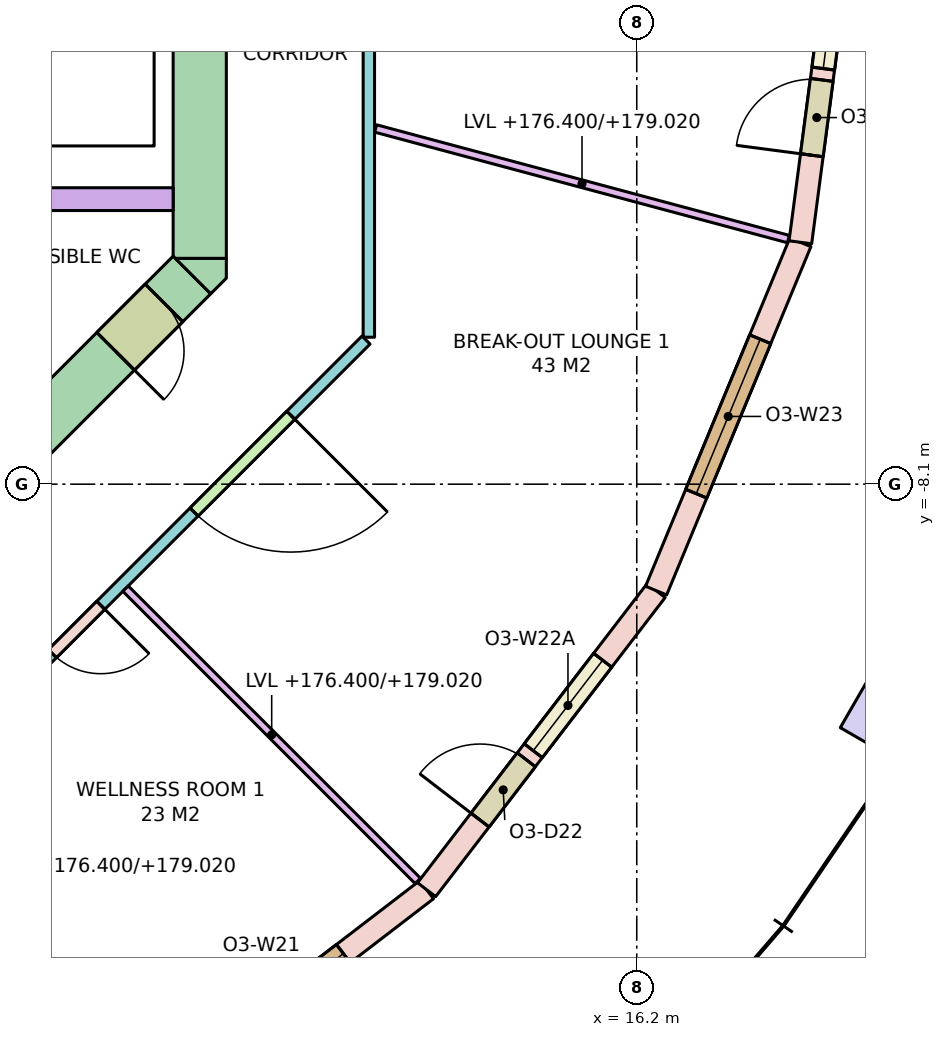
"""IFC4 building model, lengths in metres.
Left out: names, types, materials, properties, quantities, classifications, styles, units other than length and angle.
Written with IfcOpenShell. Run it as: python <this file> out.ifc"""

import sys

from ifc_helpers import new_model, si_unit, direction, frame, frame_2d, origin, origin_2d, place, context, subcontext, project, spatial, polyline, rectangle, outline, extrude, element, fill, save


model = new_model("IFC4")
c1 = context("Model", 3, precision=1e-05, world=origin(), true_north=direction((0.0, 1.0)))
c2 = subcontext(c1, "Body", "Model", "MODEL_VIEW")
j1 = project(units=[si_unit("LENGTHUNIT", "METRE"), si_unit("PLANEANGLEUNIT", "RADIAN")], contexts=[c1])
p1 = place(None, origin())
s1 = spatial("IfcSite", under=j1, at=p1, CompositionType="ELEMENT")
p2 = place(p1, origin())
s2 = spatial("IfcBuilding", under=s1, at=p2, CompositionType="ELEMENT")
p3 = place(p2, frame((0.0, 0.0, 176.4)))
s3 = spatial("IfcBuildingStorey", under=s2, at=p3, CompositionType="ELEMENT", Elevation=176.4)
p4 = place(p3, frame((19.486, -11.25, 0.0), z_axis=(0.0, 0.0, 1.0), x_axis=(0.5, 0.866025403784, 0.0)))
e1 = element("IfcColumn", 1, at=p4, inside=s3, PredefinedType="COLUMN", context=c2, shape_type="SweptSolid", body=[
    extrude(rectangle(XDim=0.7, YDim=1.0, at=origin_2d()), origin(), (0.0, 0.0, 1.0), 3.7),
])
p5 = place(p3, frame((10.45, -5.13, -0.28), z_axis=(0.0, 0.0, 1.0), x_axis=(0.0, 1.0, 0.0)))
e2 = element("IfcWall", 2, at=p5, inside=s3, PredefinedType="SHEAR", context=c2, shape_type="SweptSolid", body=[
    extrude(rectangle(XDim=10.26, YDim=0.7, at=frame_2d((5.13, 0.0))), origin(), (0.0, 0.0, 1.0), 3.7),
])
p6 = place(p5, frame((4.13, 0.0, 0.28)))
e3 = element("IfcOpeningElement", 3, at=p6, cuts=e2, PredefinedType="OPENING", context=c2, shape_type="SweptSolid", body=[
    extrude(rectangle(XDim=2.0, YDim=2.1, at=frame_2d((1.0, 1.05))), frame((0.0, 0.36, 0.0), z_axis=(0.0, -1.0, 0.0), x_axis=(1.0, 0.0, 0.0)), (0.0, 0.0, 1.0), 0.72),
])
p7 = place(p3, frame((10.347, -5.347, -0.28), z_axis=(0.0, 0.0, 1.0), x_axis=(-0.707106781187, -0.707106781187, 0.0)))
e4 = element("IfcWall", 4, at=p7, inside=s3, PredefinedType="SHEAR", context=c2, shape_type="SweptSolid", body=[
    extrude(rectangle(XDim=4.243, YDim=0.7, at=frame_2d((2.121, 0.0))), origin(), (0.0, 0.0, 1.0), 3.7),
])
p8 = place(p7, frame((0.52, 0.0, 0.28)))
e5 = element("IfcOpeningElement", 5, at=p8, cuts=e4, PredefinedType="OPENING", context=c2, shape_type="SweptSolid", body=[
    extrude(rectangle(XDim=0.9, YDim=2.1, at=frame_2d((0.45, 1.05))), frame((0.0, 0.36, 0.0), z_axis=(0.0, -1.0, 0.0), x_axis=(1.0, 0.0, 0.0)), (0.0, 0.0, 1.0), 0.72),
])
p9 = place(p3, frame((0.0, 0.0, -0.28)))
e6 = element("IfcWall", 6, at=p9, inside=s3, PredefinedType="SHEAR", context=c2, shape_type="SweptSolid", body=[
    extrude(outline(polyline([(10.8, -5.39), (10.595, -5.595), (10.595, -5.595), (10.595, -5.595), (10.13, -5.13), (10.8, -5.13), (10.8, -5.13), (10.8, -5.39)])), origin(), (0.0, 0.0, 1.0), 3.7),
])
p10 = place(p3, frame((2.0, -4.35, 0.0), z_axis=(0.0, 0.0, 1.0), x_axis=(1.0, 0.0, 0.0)))
e7 = element("IfcWall", 7, at=p10, inside=s3, PredefinedType="SOLIDWALL", context=c2, shape_type="SweptSolid", body=[
    extrude(rectangle(XDim=8.1, YDim=0.3, at=frame_2d((4.05, 0.0))), origin(), (0.0, 0.0, 1.0), 3.42),
])
p11 = place(p3, frame((9.5, -16.455, 0.0), z_axis=(0.0, 0.0, 1.0), x_axis=(0.793348024649, 0.608768356425, 0.0)))
e8 = element("IfcWall", 8, at=p11, inside=s3, PredefinedType="STANDARD", context=c2, shape_type="SweptSolid", body=[
    extrude(rectangle(XDim=4.96, YDim=0.3, at=frame_2d((2.48, 0.0))), origin(), (0.0, 0.0, 1.0), 3.42),
])
p12 = place(p11, frame((1.38, 0.0, 0.8)))
e9 = element("IfcOpeningElement", 9, at=p12, cuts=e8, PredefinedType="OPENING", context=c2, shape_type="SweptSolid", body=[
    extrude(rectangle(XDim=2.2, YDim=2.4, at=frame_2d((1.1, 1.2))), frame((0.0, 0.16, 0.0), z_axis=(0.0, -1.0, 0.0), x_axis=(1.0, 0.0, 0.0)), (0.0, 0.0, 1.0), 0.32),
])
p13 = place(p3, frame((13.435, -13.435, 0.0), z_axis=(0.0, 0.0, 1.0), x_axis=(0.608768356425, 0.793348024649, 0.0)))
e10 = element("IfcWall", 10, at=p13, inside=s3, PredefinedType="STANDARD", context=c2, shape_type="SweptSolid", body=[
    extrude(rectangle(XDim=4.96, YDim=0.3, at=frame_2d((2.48, 0.0))), origin(), (0.0, 0.0, 1.0), 3.42),
])
p14 = place(p13, frame((1.155, 0.0, 0.0)))
e11 = element("IfcOpeningElement", 11, at=p14, cuts=e10, PredefinedType="OPENING", context=c2, shape_type="SweptSolid", body=[
    extrude(rectangle(XDim=1.0, YDim=2.4, at=frame_2d((0.5, 1.2))), frame((0.0, 0.16, 0.0), z_axis=(0.0, -1.0, 0.0), x_axis=(1.0, 0.0, 0.0)), (0.0, 0.0, 1.0), 0.32),
])
p15 = place(p13, frame((2.305, 0.0, 0.8)))
e12 = element("IfcOpeningElement", 12, at=p15, cuts=e10, PredefinedType="OPENING", context=c2, shape_type="SweptSolid", body=[
    extrude(rectangle(XDim=1.5, YDim=2.4, at=frame_2d((0.75, 1.2))), frame((0.0, 0.16, 0.0), z_axis=(0.0, -1.0, 0.0), x_axis=(1.0, 0.0, 0.0)), (0.0, 0.0, 1.0), 0.32),
])
p16 = place(p3, frame((16.455, -9.5, 0.0), z_axis=(0.0, 0.0, 1.0), x_axis=(0.382650301762, 0.923893254961, 0.0)))
e13 = element("IfcWall", 13, at=p16, inside=s3, PredefinedType="STANDARD", context=c2, shape_type="SweptSolid", body=[
    extrude(rectangle(XDim=4.96, YDim=0.3, at=frame_2d((2.48, 0.0))), origin(), (0.0, 0.0, 1.0), 3.42),
])
p17 = place(p16, frame((1.38, 0.0, 0.8)))
e14 = element("IfcOpeningElement", 14, at=p17, cuts=e13, PredefinedType="OPENING", context=c2, shape_type="SweptSolid", body=[
    extrude(rectangle(XDim=2.2, YDim=2.4, at=frame_2d((1.1, 1.2))), frame((0.0, 0.16, 0.0), z_axis=(0.0, -1.0, 0.0), x_axis=(1.0, 0.0, 0.0)), (0.0, 0.0, 1.0), 0.32),
])
p18 = place(p3, frame((18.353, -4.917, 0.0), z_axis=(0.0, 0.0, 1.0), x_axis=(0.130538549191, 0.991443234469, 0.0)))
e15 = element("IfcWall", 15, at=p18, inside=s3, PredefinedType="STANDARD", context=c2, shape_type="SweptSolid", body=[
    extrude(rectangle(XDim=4.96, YDim=0.3, at=frame_2d((2.48, 0.0))), origin(), (0.0, 0.0, 1.0), 3.42),
])
p19 = place(p18, frame((1.155, 0.0, 0.0)))
e16 = element("IfcOpeningElement", 16, at=p19, cuts=e15, PredefinedType="OPENING", context=c2, shape_type="SweptSolid", body=[
    extrude(rectangle(XDim=1.0, YDim=2.4, at=frame_2d((0.5, 1.2))), frame((0.0, 0.16, 0.0), z_axis=(0.0, -1.0, 0.0), x_axis=(1.0, 0.0, 0.0)), (0.0, 0.0, 1.0), 0.32),
])
p20 = place(p18, frame((2.305, 0.0, 0.8)))
e17 = element("IfcOpeningElement", 17, at=p20, cuts=e15, PredefinedType="OPENING", context=c2, shape_type="SweptSolid", body=[
    extrude(rectangle(XDim=1.5, YDim=2.4, at=frame_2d((0.75, 1.2))), frame((0.0, 0.16, 0.0), z_axis=(0.0, -1.0, 0.0), x_axis=(1.0, 0.0, 0.0)), (0.0, 0.0, 1.0), 0.32),
])
p21 = place(p3, frame((12.638, -6.204, 0.0), z_axis=(0.0, 0.0, 1.0), x_axis=(-0.707106781187, -0.707106781187, 0.0)))
e18 = element("IfcWall", 18, at=p21, inside=s3, PredefinedType="PARTITIONING", context=c2, shape_type="SweptSolid", body=[
    extrude(rectangle(XDim=6.271, YDim=0.15, at=frame_2d((3.135, 0.0))), origin(), (0.0, 0.0, 1.0), 2.62),
])
p22 = place(p21, frame((4.935, 0.0, 0.0)))
e19 = element("IfcOpeningElement", 19, at=p22, cuts=e18, PredefinedType="OPENING", context=c2, shape_type="SweptSolid", body=[
    extrude(rectangle(XDim=0.9, YDim=2.1, at=frame_2d((0.45, 1.05))), frame((0.0, 0.085, 0.0), z_axis=(0.0, -1.0, 0.0), x_axis=(1.0, 0.0, 0.0)), (0.0, 0.0, 1.0), 0.17),
])
p23 = place(p21, frame((1.4, 0.0, 0.0)))
e20 = element("IfcOpeningElement", 20, at=p23, cuts=e18, PredefinedType="OPENING", context=c2, shape_type="SweptSolid", body=[
    extrude(rectangle(XDim=1.8, YDim=2.1, at=frame_2d((0.9, 1.05))), frame((0.0, 0.085, 0.0), z_axis=(0.0, -1.0, 0.0), x_axis=(1.0, 0.0, 0.0)), (0.0, 0.0, 1.0), 0.17),
])
p24 = place(p3, frame((12.675, 6.167, 0.0), z_axis=(0.0, 0.0, 1.0), x_axis=(0.0, -1.0, 0.0)))
e21 = element("IfcWall", 21, at=p24, inside=s3, PredefinedType="PARTITIONING", context=c2, shape_type="SweptSolid", body=[
    extrude(rectangle(XDim=12.333, YDim=0.15, at=frame_2d((6.167, 0.0))), origin(), (0.0, 0.0, 1.0), 2.62),
])
p25 = place(p24, frame((3.907, 0.0, 0.0)))
e22 = element("IfcOpeningElement", 22, at=p25, cuts=e21, PredefinedType="OPENING", context=c2, shape_type="SweptSolid", body=[
    extrude(rectangle(XDim=1.8, YDim=2.1, at=frame_2d((0.9, 1.05))), frame((0.0, 0.085, 0.0), z_axis=(0.0, -1.0, 0.0), x_axis=(1.0, 0.0, 0.0)), (0.0, 0.0, 1.0), 0.17),
])
p26 = place(p3, frame((6.221, -10.775, 0.0), z_axis=(0.0, 0.0, 1.0), x_axis=(0.500023166934, -0.866012027936, 0.0)))
e23 = element("IfcWall", 23, at=p26, inside=s3, PredefinedType="PARTITIONING", context=c2, shape_type="SweptSolid", body=[
    extrude(rectangle(XDim=6.395, YDim=0.1, at=frame_2d((3.198, 0.0))), origin(), (0.0, 0.0, 1.0), 2.62),
])
p27 = place(p3, frame((9.474, -9.474, 0.0), z_axis=(0.0, 0.0, 1.0), x_axis=(0.707106781187, -0.707106781187, 0.0)))
e24 = element("IfcWall", 24, at=p27, inside=s3, PredefinedType="PARTITIONING", context=c2, shape_type="SweptSolid", body=[
    extrude(rectangle(XDim=5.439, YDim=0.1, at=frame_2d((2.719, 0.0))), origin(), (0.0, 0.0, 1.0), 2.62),
])
p28 = place(p3, frame((12.764, -3.42, 0.0), z_axis=(0.0, 0.0, 1.0), x_axis=(0.965925759926, -0.258819292773, 0.0)))
e25 = element("IfcWall", 25, at=p28, inside=s3, PredefinedType="PARTITIONING", context=c2, shape_type="SweptSolid", body=[
    extrude(rectangle(XDim=5.622, YDim=0.1, at=frame_2d((2.811, 0.0))), origin(), (0.0, 0.0, 1.0), 2.62),
])
p29 = place(p12, origin())
e26 = element("IfcWindow", 26, at=p29, inside=s3, PartitioningType="SINGLE_PANEL", PredefinedType="WINDOW", context=c2, shape_type="SweptSolid", body=[
    extrude(rectangle(XDim=2.2, YDim=2.4, at=frame_2d((1.1, 1.2))), frame((0.0, 0.03, 0.0), z_axis=(0.0, -1.0, 0.0), x_axis=(1.0, 0.0, 0.0)), (0.0, 0.0, 1.0), 0.06),
])
fill(e9, e26)
p30 = place(p14, origin())
e27 = element("IfcDoor", 27, at=p30, inside=s3, OperationType="SINGLE_SWING_LEFT", PredefinedType="DOOR", context=c2, shape_type="SweptSolid", body=[
    extrude(rectangle(XDim=1.0, YDim=2.4, at=frame_2d((0.5, 1.2))), frame((0.0, 0.025, 0.0), z_axis=(0.0, -1.0, 0.0), x_axis=(1.0, 0.0, 0.0)), (0.0, 0.0, 1.0), 0.05),
])
fill(e11, e27)
p31 = place(p15, origin())
e28 = element("IfcWindow", 28, at=p31, inside=s3, PartitioningType="SINGLE_PANEL", PredefinedType="WINDOW", context=c2, shape_type="SweptSolid", body=[
    extrude(rectangle(XDim=1.5, YDim=2.4, at=frame_2d((0.75, 1.2))), frame((0.0, 0.03, 0.0), z_axis=(0.0, -1.0, 0.0), x_axis=(1.0, 0.0, 0.0)), (0.0, 0.0, 1.0), 0.06),
])
fill(e12, e28)
p32 = place(p17, origin())
e29 = element("IfcWindow", 29, at=p32, inside=s3, PartitioningType="SINGLE_PANEL", PredefinedType="WINDOW", context=c2, shape_type="SweptSolid", body=[
    extrude(rectangle(XDim=2.2, YDim=2.4, at=frame_2d((1.1, 1.2))), frame((0.0, 0.03, 0.0), z_axis=(0.0, -1.0, 0.0), x_axis=(1.0, 0.0, 0.0)), (0.0, 0.0, 1.0), 0.06),
])
fill(e14, e29)
p33 = place(p19, origin())
e30 = element("IfcDoor", 30, at=p33, inside=s3, OperationType="SINGLE_SWING_LEFT", PredefinedType="DOOR", context=c2, shape_type="SweptSolid", body=[
    extrude(rectangle(XDim=1.0, YDim=2.4, at=frame_2d((0.5, 1.2))), frame((0.0, 0.025, 0.0), z_axis=(0.0, -1.0, 0.0), x_axis=(1.0, 0.0, 0.0)), (0.0, 0.0, 1.0), 0.05),
])
fill(e16, e30)
p34 = place(p20, origin())
e31 = element("IfcWindow", 31, at=p34, inside=s3, PartitioningType="SINGLE_PANEL", PredefinedType="WINDOW", context=c2, shape_type="SweptSolid", body=[
    extrude(rectangle(XDim=1.5, YDim=2.4, at=frame_2d((0.75, 1.2))), frame((0.0, 0.03, 0.0), z_axis=(0.0, -1.0, 0.0), x_axis=(1.0, 0.0, 0.0)), (0.0, 0.0, 1.0), 0.06),
])
fill(e17, e31)
p35 = place(p8, origin())
e32 = element("IfcDoor", 32, at=p35, inside=s3, OperationType="SINGLE_SWING_RIGHT", PredefinedType="DOOR", context=c2, shape_type="SweptSolid", body=[
    extrude(rectangle(XDim=0.9, YDim=2.1, at=frame_2d((0.45, 1.05))), frame((0.0, 0.025, 0.0), z_axis=(0.0, -1.0, 0.0), x_axis=(1.0, 0.0, 0.0)), (0.0, 0.0, 1.0), 0.05),
])
fill(e5, e32)
p36 = place(p22, origin())
e33 = element("IfcDoor", 33, at=p36, inside=s3, OperationType="SINGLE_SWING_LEFT", PredefinedType="DOOR", context=c2, shape_type="SweptSolid", body=[
    extrude(rectangle(XDim=0.9, YDim=2.1, at=frame_2d((0.45, 1.05))), frame((0.0, 0.025, 0.0), z_axis=(0.0, -1.0, 0.0), x_axis=(1.0, 0.0, 0.0)), (0.0, 0.0, 1.0), 0.05),
])
fill(e19, e33)
p37 = place(p23, origin())
e34 = element("IfcDoor", 34, at=p37, inside=s3, OperationType="DOUBLE_DOOR_SINGLE_SWING", PredefinedType="DOOR", context=c2, shape_type="SweptSolid", body=[
    extrude(rectangle(XDim=1.8, YDim=2.1, at=frame_2d((0.9, 1.05))), frame((0.0, 0.025, 0.0), z_axis=(0.0, -1.0, 0.0), x_axis=(1.0, 0.0, 0.0)), (0.0, 0.0, 1.0), 0.05),
])
fill(e20, e34)
save(model, sys.argv[1])
